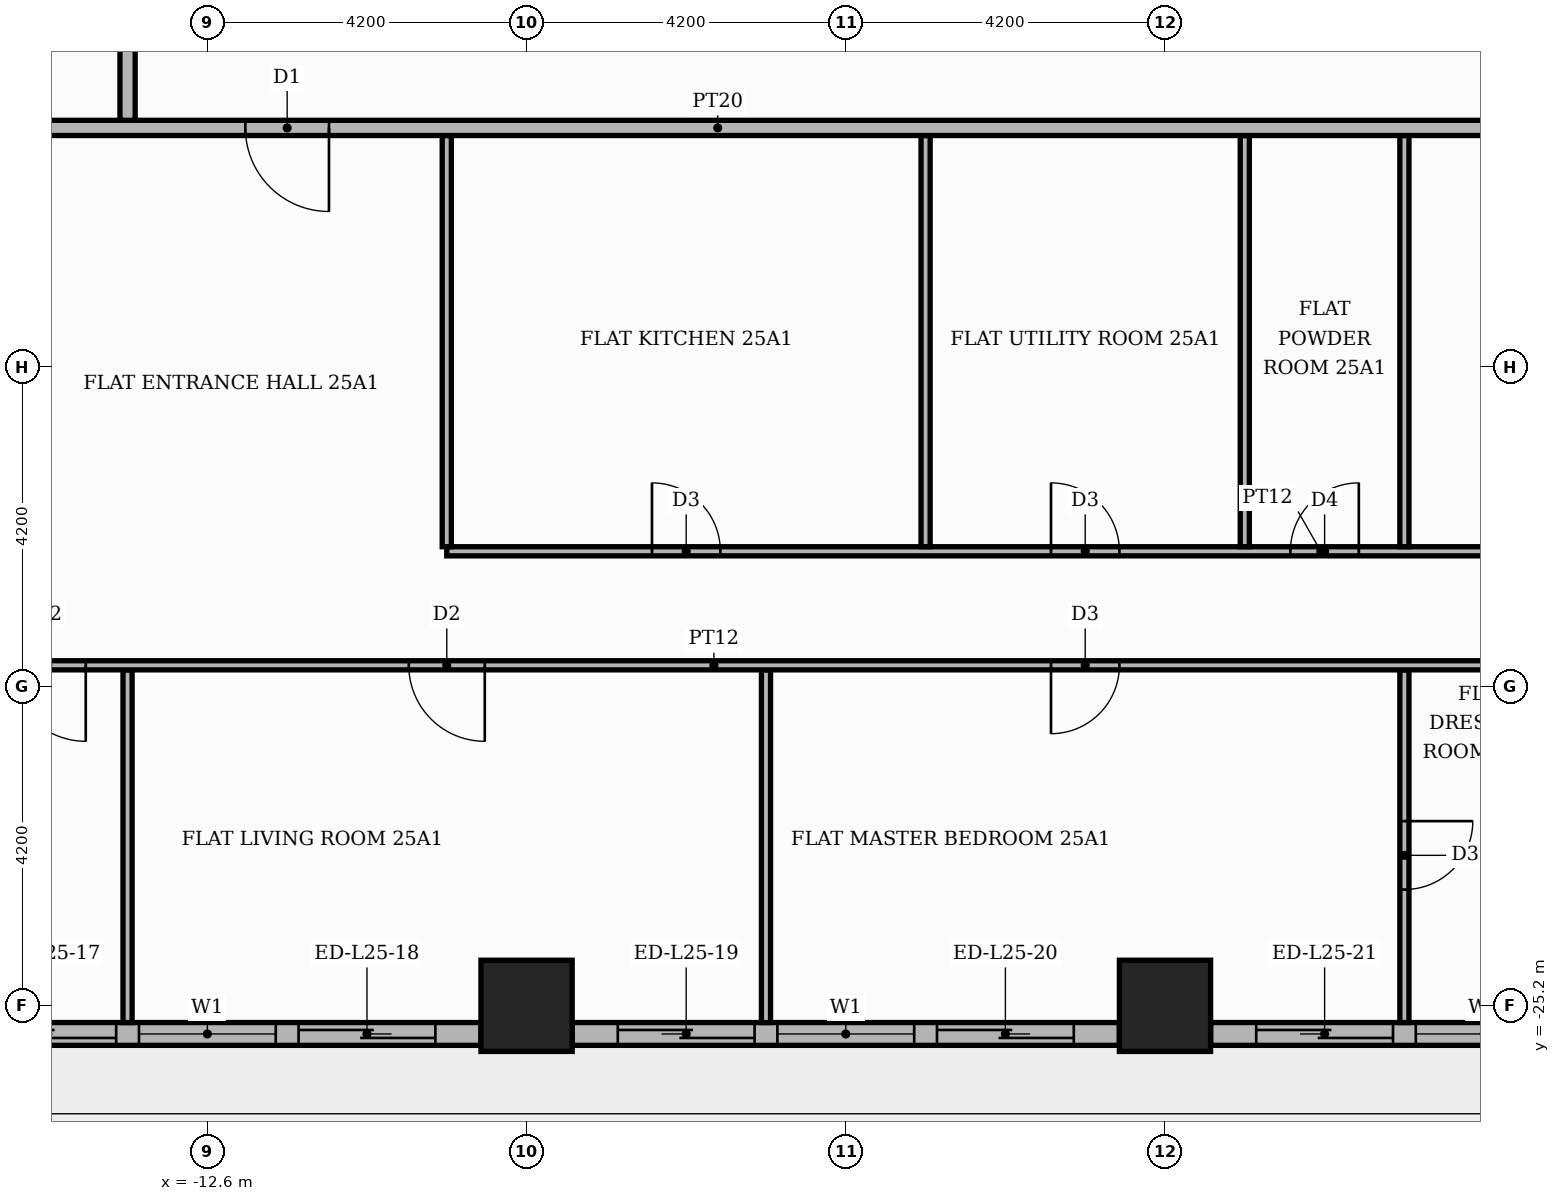
"""IFC4 building model, lengths in metres.
Left out: names, types, materials, properties, quantities, classifications, styles, units other than length and angle.
Written with IfcOpenShell. Run it as: python <this file> out.ifc"""

import sys

from ifc_helpers import new_model, si_unit, direction, frame, frame_2d, origin, origin_2d, place, context, subcontext, project, spatial, rectangle, extrude, element, fill, save


model = new_model("IFC4")
c1 = context("Model", 3, precision=1e-05, world=origin(), true_north=direction((0.0, 1.0)))
c2 = subcontext(c1, "Body", "Model", "MODEL_VIEW")
j1 = project(units=[si_unit("LENGTHUNIT", "METRE"), si_unit("PLANEANGLEUNIT", "RADIAN")], contexts=[c1])
p1 = place(None, origin())
s1 = spatial("IfcSite", under=j1, at=p1, CompositionType="ELEMENT")
p2 = place(p1, origin())
s2 = spatial("IfcBuilding", under=s1, at=p2, CompositionType="ELEMENT")
p3 = place(p2, frame((0.0, 0.0, 106.5)))
s3 = spatial("IfcBuildingStorey", under=s2, at=p3, CompositionType="ELEMENT", Elevation=106.5)
for number, where, z_axis, x_axis in (
    (1, (0.0, -25.2, 0.0), (0.0, 0.0, 1.0), (1.0, 0.0, 0.0)),
    (2, (-8.4, -25.2, 0.0), (0.0, 0.0, 1.0), (1.0, 0.0, 0.0)),
):
    element("IfcColumn", number, at=place(p3, frame(where, z_axis=z_axis, x_axis=x_axis)), inside=s3, PredefinedType="COLUMN", context=c2, shape_type="SweptSolid", body=[
        extrude(rectangle(XDim=1.2, YDim=1.2, at=origin_2d()), origin(), (0.0, 0.0, 1.0), 3.9),
    ])
p4 = place(p3, frame((-16.2, -25.57, 0.0), z_axis=(0.0, 0.0, 1.0), x_axis=(1.0, 0.0, 0.0)))
e3 = element("IfcWall", 3, at=p4, inside=s3, PredefinedType="STANDARD", context=c2, shape_type="SweptSolid", body=[
    extrude(rectangle(XDim=7.2, YDim=0.3, at=frame_2d((3.6, 0.0))), origin(), (0.0, 0.0, 1.0), 3.48),
])
p5 = place(p4, frame((0.6, 0.0, 0.0)))
e4 = element("IfcOpeningElement", 4, at=p5, cuts=e3, PredefinedType="OPENING", context=c2, shape_type="SweptSolid", body=[
    extrude(rectangle(XDim=1.8, YDim=2.4, at=frame_2d((0.9, 1.2))), frame((0.0, 0.16, 0.0), z_axis=(0.0, -1.0, 0.0), x_axis=(1.0, 0.0, 0.0)), (0.0, 0.0, 1.0), 0.32),
])
p6 = place(p4, frame((2.7, 0.0, 0.9)))
e5 = element("IfcOpeningElement", 5, at=p6, cuts=e3, PredefinedType="OPENING", context=c2, shape_type="SweptSolid", body=[
    extrude(rectangle(XDim=1.8, YDim=2.1, at=frame_2d((0.9, 1.05))), frame((0.0, 0.16, 0.0), z_axis=(0.0, -1.0, 0.0), x_axis=(1.0, 0.0, 0.0)), (0.0, 0.0, 1.0), 0.32),
])
p7 = place(p4, frame((4.8, 0.0, 0.0)))
e6 = element("IfcOpeningElement", 6, at=p7, cuts=e3, PredefinedType="OPENING", context=c2, shape_type="SweptSolid", body=[
    extrude(rectangle(XDim=1.8, YDim=2.4, at=frame_2d((0.9, 1.2))), frame((0.0, 0.16, 0.0), z_axis=(0.0, -1.0, 0.0), x_axis=(1.0, 0.0, 0.0)), (0.0, 0.0, 1.0), 0.32),
])
p8 = place(p3, frame((-7.8, -25.57, 0.0), z_axis=(0.0, 0.0, 1.0), x_axis=(1.0, 0.0, 0.0)))
e7 = element("IfcWall", 7, at=p8, inside=s3, PredefinedType="STANDARD", context=c2, shape_type="SweptSolid", body=[
    extrude(rectangle(XDim=7.2, YDim=0.3, at=frame_2d((3.6, 0.0))), origin(), (0.0, 0.0, 1.0), 3.48),
])
p9 = place(p8, frame((0.6, 0.0, 0.0)))
e8 = element("IfcOpeningElement", 8, at=p9, cuts=e7, PredefinedType="OPENING", context=c2, shape_type="SweptSolid", body=[
    extrude(rectangle(XDim=1.8, YDim=2.4, at=frame_2d((0.9, 1.2))), frame((0.0, 0.16, 0.0), z_axis=(0.0, -1.0, 0.0), x_axis=(1.0, 0.0, 0.0)), (0.0, 0.0, 1.0), 0.32),
])
p10 = place(p8, frame((2.7, 0.0, 0.9)))
e9 = element("IfcOpeningElement", 9, at=p10, cuts=e7, PredefinedType="OPENING", context=c2, shape_type="SweptSolid", body=[
    extrude(rectangle(XDim=1.8, YDim=2.1, at=frame_2d((0.9, 1.05))), frame((0.0, 0.16, 0.0), z_axis=(0.0, -1.0, 0.0), x_axis=(1.0, 0.0, 0.0)), (0.0, 0.0, 1.0), 0.32),
])
p11 = place(p8, frame((4.8, 0.0, 0.0)))
e10 = element("IfcOpeningElement", 10, at=p11, cuts=e7, PredefinedType="OPENING", context=c2, shape_type="SweptSolid", body=[
    extrude(rectangle(XDim=1.8, YDim=2.4, at=frame_2d((0.9, 1.2))), frame((0.0, 0.16, 0.0), z_axis=(0.0, -1.0, 0.0), x_axis=(1.0, 0.0, 0.0)), (0.0, 0.0, 1.0), 0.32),
])
p12 = place(p3, frame((0.6, -25.57, 0.0), z_axis=(0.0, 0.0, 1.0), x_axis=(1.0, 0.0, 0.0)))
e11 = element("IfcWall", 11, at=p12, inside=s3, PredefinedType="STANDARD", context=c2, shape_type="SweptSolid", body=[
    extrude(rectangle(XDim=7.2, YDim=0.3, at=frame_2d((3.6, 0.0))), origin(), (0.0, 0.0, 1.0), 3.48),
])
p13 = place(p12, frame((0.6, 0.0, 0.0)))
e12 = element("IfcOpeningElement", 12, at=p13, cuts=e11, PredefinedType="OPENING", context=c2, shape_type="SweptSolid", body=[
    extrude(rectangle(XDim=1.8, YDim=2.4, at=frame_2d((0.9, 1.2))), frame((0.0, 0.16, 0.0), z_axis=(0.0, -1.0, 0.0), x_axis=(1.0, 0.0, 0.0)), (0.0, 0.0, 1.0), 0.32),
])
p14 = place(p12, frame((2.7, 0.0, 0.9)))
e13 = element("IfcOpeningElement", 13, at=p14, cuts=e11, PredefinedType="OPENING", context=c2, shape_type="SweptSolid", body=[
    extrude(rectangle(XDim=1.8, YDim=2.1, at=frame_2d((0.9, 1.05))), frame((0.0, 0.16, 0.0), z_axis=(0.0, -1.0, 0.0), x_axis=(1.0, 0.0, 0.0)), (0.0, 0.0, 1.0), 0.32),
])
p15 = place(p12, frame((4.8, 0.0, 0.9)))
e14 = element("IfcOpeningElement", 14, at=p15, cuts=e11, PredefinedType="OPENING", context=c2, shape_type="SweptSolid", body=[
    extrude(rectangle(XDim=1.8, YDim=2.1, at=frame_2d((0.9, 1.05))), frame((0.0, 0.16, 0.0), z_axis=(0.0, -1.0, 0.0), x_axis=(1.0, 0.0, 0.0)), (0.0, 0.0, 1.0), 0.32),
])
for number, where, z_axis, x_axis in (
    (15, (-13.65, -25.42, 0.0), (0.0, 0.0, 1.0), (0.0, 1.0, 0.0)),
    (16, (-5.25, -25.42, 0.0), (0.0, 0.0, 1.0), (0.0, 1.0, 0.0)),
):
    element("IfcWall", number, at=place(p3, frame(where, z_axis=z_axis, x_axis=x_axis)), inside=s3, PredefinedType="PARTITIONING", context=c2, shape_type="SweptSolid", body=[
        extrude(rectangle(XDim=4.64, YDim=0.12, at=frame_2d((2.32, 0.0))), origin(), (0.0, 0.0, 1.0), 3.48),
    ])
p16 = place(p3, frame((3.15, -25.42, 0.0), z_axis=(0.0, 0.0, 1.0), x_axis=(0.0, 1.0, 0.0)))
e17 = element("IfcWall", 17, at=p16, inside=s3, PredefinedType="PARTITIONING", context=c2, shape_type="SweptSolid", body=[
    extrude(rectangle(XDim=4.64, YDim=0.12, at=frame_2d((2.32, 0.0))), origin(), (0.0, 0.0, 1.0), 3.48),
])
p17 = place(p16, frame((1.75, 0.0, 0.0)))
e18 = element("IfcOpeningElement", 18, at=p17, cuts=e17, PredefinedType="OPENING", context=c2, shape_type="SweptSolid", body=[
    extrude(rectangle(XDim=0.9, YDim=2.1, at=frame_2d((0.45, 1.05))), frame((0.0, 0.07, 0.0), z_axis=(0.0, -1.0, 0.0), x_axis=(1.0, 0.0, 0.0)), (0.0, 0.0, 1.0), 0.14),
])
p18 = place(p3, frame((-25.42, -20.72, 0.0), z_axis=(0.0, 0.0, 1.0), x_axis=(1.0, 0.0, 0.0)))
e19 = element("IfcWall", 19, at=p18, inside=s3, PredefinedType="PARTITIONING", context=c2, shape_type="SweptSolid", body=[
    extrude(rectangle(XDim=38.97, YDim=0.12, at=frame_2d((19.485, 0.0))), origin(), (0.0, 0.0, 1.0), 3.48),
])
p19 = place(p18, frame((10.22, 0.0, 0.0)))
e20 = element("IfcOpeningElement", 20, at=p19, cuts=e19, PredefinedType="OPENING", context=c2, shape_type="SweptSolid", body=[
    extrude(rectangle(XDim=1.0, YDim=2.1, at=frame_2d((0.5, 1.05))), frame((0.0, 0.07, 0.0), z_axis=(0.0, -1.0, 0.0), x_axis=(1.0, 0.0, 0.0)), (0.0, 0.0, 1.0), 0.14),
])
p20 = place(p18, frame((15.47, 0.0, 0.0)))
e21 = element("IfcOpeningElement", 21, at=p20, cuts=e19, PredefinedType="OPENING", context=c2, shape_type="SweptSolid", body=[
    extrude(rectangle(XDim=1.0, YDim=2.1, at=frame_2d((0.5, 1.05))), frame((0.0, 0.07, 0.0), z_axis=(0.0, -1.0, 0.0), x_axis=(1.0, 0.0, 0.0)), (0.0, 0.0, 1.0), 0.14),
])
p21 = place(p18, frame((23.92, 0.0, 0.0)))
e22 = element("IfcOpeningElement", 22, at=p21, cuts=e19, PredefinedType="OPENING", context=c2, shape_type="SweptSolid", body=[
    extrude(rectangle(XDim=0.9, YDim=2.1, at=frame_2d((0.45, 1.05))), frame((0.0, 0.07, 0.0), z_axis=(0.0, -1.0, 0.0), x_axis=(1.0, 0.0, 0.0)), (0.0, 0.0, 1.0), 0.14),
])
p22 = place(p18, frame((34.42, 0.0, 0.0)))
e23 = element("IfcOpeningElement", 23, at=p22, cuts=e19, PredefinedType="OPENING", context=c2, shape_type="SweptSolid", body=[
    extrude(rectangle(XDim=0.9, YDim=2.1, at=frame_2d((0.45, 1.05))), frame((0.0, 0.07, 0.0), z_axis=(0.0, -1.0, 0.0), x_axis=(1.0, 0.0, 0.0)), (0.0, 0.0, 1.0), 0.14),
])
p23 = place(p3, frame((-9.45, -19.22, 0.0), z_axis=(0.0, 0.0, 1.0), x_axis=(1.0, 0.0, 0.0)))
e24 = element("IfcWall", 24, at=p23, inside=s3, PredefinedType="PARTITIONING", context=c2, shape_type="SweptSolid", body=[
    extrude(rectangle(XDim=23.0, YDim=0.12, at=frame_2d((11.5, 0.0))), origin(), (0.0, 0.0, 1.0), 3.48),
])
p24 = place(p23, frame((2.7, 0.0, 0.0)))
e25 = element("IfcOpeningElement", 25, at=p24, cuts=e24, PredefinedType="OPENING", context=c2, shape_type="SweptSolid", body=[
    extrude(rectangle(XDim=0.9, YDim=2.1, at=frame_2d((0.45, 1.05))), frame((0.0, 0.07, 0.0), z_axis=(0.0, -1.0, 0.0), x_axis=(1.0, 0.0, 0.0)), (0.0, 0.0, 1.0), 0.14),
])
p25 = place(p23, frame((7.95, 0.0, 0.0)))
e26 = element("IfcOpeningElement", 26, at=p25, cuts=e24, PredefinedType="OPENING", context=c2, shape_type="SweptSolid", body=[
    extrude(rectangle(XDim=0.9, YDim=2.1, at=frame_2d((0.45, 1.05))), frame((0.0, 0.07, 0.0), z_axis=(0.0, -1.0, 0.0), x_axis=(1.0, 0.0, 0.0)), (0.0, 0.0, 1.0), 0.14),
])
p26 = place(p23, frame((11.1, 0.0, 0.0)))
e27 = element("IfcOpeningElement", 27, at=p26, cuts=e24, PredefinedType="OPENING", context=c2, shape_type="SweptSolid", body=[
    extrude(rectangle(XDim=0.9, YDim=2.1, at=frame_2d((0.45, 1.05))), frame((0.0, 0.07, 0.0), z_axis=(0.0, -1.0, 0.0), x_axis=(1.0, 0.0, 0.0)), (0.0, 0.0, 1.0), 0.14),
])
p27 = place(p23, frame((15.15, 0.0, 0.0)))
e28 = element("IfcOpeningElement", 28, at=p27, cuts=e24, PredefinedType="OPENING", context=c2, shape_type="SweptSolid", body=[
    extrude(rectangle(XDim=0.9, YDim=2.1, at=frame_2d((0.45, 1.05))), frame((0.0, 0.07, 0.0), z_axis=(0.0, -1.0, 0.0), x_axis=(1.0, 0.0, 0.0)), (0.0, 0.0, 1.0), 0.14),
])
p28 = place(p23, frame((19.35, 0.0, 0.0)))
e29 = element("IfcOpeningElement", 29, at=p28, cuts=e24, PredefinedType="OPENING", context=c2, shape_type="SweptSolid", body=[
    extrude(rectangle(XDim=0.9, YDim=2.1, at=frame_2d((0.45, 1.05))), frame((0.0, 0.07, 0.0), z_axis=(0.0, -1.0, 0.0), x_axis=(1.0, 0.0, 0.0)), (0.0, 0.0, 1.0), 0.14),
])
p29 = place(p23, frame((21.6, 0.0, 0.0)))
e30 = element("IfcOpeningElement", 30, at=p29, cuts=e24, PredefinedType="OPENING", context=c2, shape_type="SweptSolid", body=[
    extrude(rectangle(XDim=0.9, YDim=2.1, at=frame_2d((0.45, 1.05))), frame((0.0, 0.07, 0.0), z_axis=(0.0, -1.0, 0.0), x_axis=(1.0, 0.0, 0.0)), (0.0, 0.0, 1.0), 0.14),
])
for number, where, z_axis, x_axis in (
    (31, (-9.45, -19.16, 0.0), (0.0, 0.0, 1.0), (0.0, 1.0, 0.0)),
    (32, (-3.15, -19.16, 0.0), (0.0, 0.0, 1.0), (0.0, 1.0, 0.0)),
    (33, (1.05, -19.16, 0.0), (0.0, 0.0, 1.0), (0.0, 1.0, 0.0)),
    (34, (3.15, -19.16, 0.0), (0.0, 0.0, 1.0), (0.0, 1.0, 0.0)),
):
    element("IfcWall", number, at=place(p3, frame(where, z_axis=z_axis, x_axis=x_axis)), inside=s3, PredefinedType="PARTITIONING", context=c2, shape_type="SweptSolid", body=[
        extrude(rectangle(XDim=5.41, YDim=0.12, at=frame_2d((2.705, 0.0))), origin(), (0.0, 0.0, 1.0), 3.48),
    ])
p30 = place(p3, frame((-25.42, -13.65, 0.0), z_axis=(0.0, 0.0, 1.0), x_axis=(1.0, 0.0, 0.0)))
e35 = element("IfcWall", 35, at=p30, inside=s3, PredefinedType="PARTITIONING", context=c2, shape_type="SweptSolid", body=[
    extrude(rectangle(XDim=39.07, YDim=0.2, at=frame_2d((19.535, 0.0))), origin(), (0.0, 0.0, 1.0), 3.48),
])
p31 = place(p30, frame((13.32, 0.0, 0.0)))
e36 = element("IfcOpeningElement", 36, at=p31, cuts=e35, PredefinedType="OPENING", context=c2, shape_type="SweptSolid", body=[
    extrude(rectangle(XDim=1.1, YDim=2.4, at=frame_2d((0.55, 1.2))), frame((0.0, 0.11, 0.0), z_axis=(0.0, -1.0, 0.0), x_axis=(1.0, 0.0, 0.0)), (0.0, 0.0, 1.0), 0.22),
])
p32 = place(p3, frame((-13.65, -13.55, 0.0), z_axis=(0.0, 0.0, 1.0), x_axis=(0.0, 1.0, 0.0)))
e37 = element("IfcWall", 37, at=p32, inside=s3, PredefinedType="PARTITIONING", context=c2, shape_type="SweptSolid", body=[
    extrude(rectangle(XDim=27.1, YDim=0.2, at=frame_2d((13.55, 0.0))), origin(), (0.0, 0.0, 1.0), 3.48),
])
p33 = place(p32, frame((24.55, 0.0, 0.0)))
e38 = element("IfcOpeningElement", 38, at=p33, cuts=e37, PredefinedType="OPENING", context=c2, shape_type="SweptSolid", body=[
    extrude(rectangle(XDim=1.1, YDim=2.4, at=frame_2d((0.55, 1.2))), frame((0.0, 0.11, 0.0), z_axis=(0.0, -1.0, 0.0), x_axis=(1.0, 0.0, 0.0)), (0.0, 0.0, 1.0), 0.22),
])
p34 = place(p5, origin())
e39 = element("IfcDoor", 39, at=p34, inside=s3, OperationType="SLIDING_TO_LEFT", PredefinedType="DOOR", context=c2, shape_type="SweptSolid", body=[
    extrude(rectangle(XDim=1.8, YDim=2.4, at=frame_2d((0.9, 1.2))), frame((0.0, 0.025, 0.0), z_axis=(0.0, -1.0, 0.0), x_axis=(1.0, 0.0, 0.0)), (0.0, 0.0, 1.0), 0.05),
])
fill(e4, e39)
p35 = place(p6, origin())
e40 = element("IfcWindow", 40, at=p35, inside=s3, PartitioningType="SINGLE_PANEL", PredefinedType="WINDOW", context=c2, shape_type="SweptSolid", body=[
    extrude(rectangle(XDim=1.8, YDim=2.1, at=frame_2d((0.9, 1.05))), frame((0.0, 0.03, 0.0), z_axis=(0.0, -1.0, 0.0), x_axis=(1.0, 0.0, 0.0)), (0.0, 0.0, 1.0), 0.06),
])
fill(e5, e40)
p36 = place(p7, origin())
e41 = element("IfcDoor", 41, at=p36, inside=s3, OperationType="SLIDING_TO_RIGHT", PredefinedType="DOOR", context=c2, shape_type="SweptSolid", body=[
    extrude(rectangle(XDim=1.8, YDim=2.4, at=frame_2d((0.9, 1.2))), frame((0.0, 0.025, 0.0), z_axis=(0.0, -1.0, 0.0), x_axis=(1.0, 0.0, 0.0)), (0.0, 0.0, 1.0), 0.05),
])
fill(e6, e41)
p37 = place(p9, origin())
e42 = element("IfcDoor", 42, at=p37, inside=s3, OperationType="SLIDING_TO_LEFT", PredefinedType="DOOR", context=c2, shape_type="SweptSolid", body=[
    extrude(rectangle(XDim=1.8, YDim=2.4, at=frame_2d((0.9, 1.2))), frame((0.0, 0.025, 0.0), z_axis=(0.0, -1.0, 0.0), x_axis=(1.0, 0.0, 0.0)), (0.0, 0.0, 1.0), 0.05),
])
fill(e8, e42)
p38 = place(p10, origin())
e43 = element("IfcWindow", 43, at=p38, inside=s3, PartitioningType="SINGLE_PANEL", PredefinedType="WINDOW", context=c2, shape_type="SweptSolid", body=[
    extrude(rectangle(XDim=1.8, YDim=2.1, at=frame_2d((0.9, 1.05))), frame((0.0, 0.03, 0.0), z_axis=(0.0, -1.0, 0.0), x_axis=(1.0, 0.0, 0.0)), (0.0, 0.0, 1.0), 0.06),
])
fill(e9, e43)
p39 = place(p11, origin())
e44 = element("IfcDoor", 44, at=p39, inside=s3, OperationType="SLIDING_TO_RIGHT", PredefinedType="DOOR", context=c2, shape_type="SweptSolid", body=[
    extrude(rectangle(XDim=1.8, YDim=2.4, at=frame_2d((0.9, 1.2))), frame((0.0, 0.025, 0.0), z_axis=(0.0, -1.0, 0.0), x_axis=(1.0, 0.0, 0.0)), (0.0, 0.0, 1.0), 0.05),
])
fill(e10, e44)
p40 = place(p13, origin())
e45 = element("IfcDoor", 45, at=p40, inside=s3, OperationType="SLIDING_TO_LEFT", PredefinedType="DOOR", context=c2, shape_type="SweptSolid", body=[
    extrude(rectangle(XDim=1.8, YDim=2.4, at=frame_2d((0.9, 1.2))), frame((0.0, 0.025, 0.0), z_axis=(0.0, -1.0, 0.0), x_axis=(1.0, 0.0, 0.0)), (0.0, 0.0, 1.0), 0.05),
])
fill(e12, e45)
p41 = place(p14, origin())
e46 = element("IfcWindow", 46, at=p41, inside=s3, PartitioningType="SINGLE_PANEL", PredefinedType="WINDOW", context=c2, shape_type="SweptSolid", body=[
    extrude(rectangle(XDim=1.8, YDim=2.1, at=frame_2d((0.9, 1.05))), frame((0.0, 0.03, 0.0), z_axis=(0.0, -1.0, 0.0), x_axis=(1.0, 0.0, 0.0)), (0.0, 0.0, 1.0), 0.06),
])
fill(e13, e46)
p42 = place(p31, frame((1.1, 0.0, 0.0), z_axis=(0.0, 0.0, 1.0), x_axis=(-1.0, 0.0, 0.0)))
e47 = element("IfcDoor", 47, at=p42, inside=s3, OperationType="SINGLE_SWING_RIGHT", PredefinedType="DOOR", context=c2, shape_type="SweptSolid", body=[
    extrude(rectangle(XDim=1.1, YDim=2.4, at=frame_2d((0.55, 1.2))), frame((0.0, 0.025, 0.0), z_axis=(0.0, -1.0, 0.0), x_axis=(1.0, 0.0, 0.0)), (0.0, 0.0, 1.0), 0.05),
])
fill(e36, e47)
p43 = place(p24, origin())
e48 = element("IfcDoor", 48, at=p43, inside=s3, OperationType="SINGLE_SWING_LEFT", PredefinedType="DOOR", context=c2, shape_type="SweptSolid", body=[
    extrude(rectangle(XDim=0.9, YDim=2.1, at=frame_2d((0.45, 1.05))), frame((0.0, 0.025, 0.0), z_axis=(0.0, -1.0, 0.0), x_axis=(1.0, 0.0, 0.0)), (0.0, 0.0, 1.0), 0.05),
])
fill(e25, e48)
p44 = place(p25, origin())
e49 = element("IfcDoor", 49, at=p44, inside=s3, OperationType="SINGLE_SWING_LEFT", PredefinedType="DOOR", context=c2, shape_type="SweptSolid", body=[
    extrude(rectangle(XDim=0.9, YDim=2.1, at=frame_2d((0.45, 1.05))), frame((0.0, 0.025, 0.0), z_axis=(0.0, -1.0, 0.0), x_axis=(1.0, 0.0, 0.0)), (0.0, 0.0, 1.0), 0.05),
])
fill(e26, e49)
p45 = place(p26, origin())
e50 = element("IfcDoor", 50, at=p45, inside=s3, OperationType="SINGLE_SWING_RIGHT", PredefinedType="DOOR", context=c2, shape_type="SweptSolid", body=[
    extrude(rectangle(XDim=0.9, YDim=2.1, at=frame_2d((0.45, 1.05))), frame((0.0, 0.025, 0.0), z_axis=(0.0, -1.0, 0.0), x_axis=(1.0, 0.0, 0.0)), (0.0, 0.0, 1.0), 0.05),
])
fill(e27, e50)
p46 = place(p19, frame((1.0, 0.0, 0.0), z_axis=(0.0, 0.0, 1.0), x_axis=(-1.0, 0.0, 0.0)))
e51 = element("IfcDoor", 51, at=p46, inside=s3, OperationType="SINGLE_SWING_RIGHT", PredefinedType="DOOR", context=c2, shape_type="SweptSolid", body=[
    extrude(rectangle(XDim=1.0, YDim=2.1, at=frame_2d((0.5, 1.05))), frame((0.0, 0.025, 0.0), z_axis=(0.0, -1.0, 0.0), x_axis=(1.0, 0.0, 0.0)), (0.0, 0.0, 1.0), 0.05),
])
fill(e20, e51)
p47 = place(p20, frame((1.0, 0.0, 0.0), z_axis=(0.0, 0.0, 1.0), x_axis=(-1.0, 0.0, 0.0)))
e52 = element("IfcDoor", 52, at=p47, inside=s3, OperationType="SINGLE_SWING_RIGHT", PredefinedType="DOOR", context=c2, shape_type="SweptSolid", body=[
    extrude(rectangle(XDim=1.0, YDim=2.1, at=frame_2d((0.5, 1.05))), frame((0.0, 0.025, 0.0), z_axis=(0.0, -1.0, 0.0), x_axis=(1.0, 0.0, 0.0)), (0.0, 0.0, 1.0), 0.05),
])
fill(e21, e52)
p48 = place(p21, frame((0.9, 0.0, 0.0), z_axis=(0.0, 0.0, 1.0), x_axis=(-1.0, 0.0, 0.0)))
e53 = element("IfcDoor", 53, at=p48, inside=s3, OperationType="SINGLE_SWING_LEFT", PredefinedType="DOOR", context=c2, shape_type="SweptSolid", body=[
    extrude(rectangle(XDim=0.9, YDim=2.1, at=frame_2d((0.45, 1.05))), frame((0.0, 0.025, 0.0), z_axis=(0.0, -1.0, 0.0), x_axis=(1.0, 0.0, 0.0)), (0.0, 0.0, 1.0), 0.05),
])
fill(e22, e53)
p49 = place(p17, frame((0.9, 0.0, 0.0), z_axis=(0.0, 0.0, 1.0), x_axis=(-1.0, 0.0, 0.0)))
e54 = element("IfcDoor", 54, at=p49, inside=s3, OperationType="SINGLE_SWING_RIGHT", PredefinedType="DOOR", context=c2, shape_type="SweptSolid", body=[
    extrude(rectangle(XDim=0.9, YDim=2.1, at=frame_2d((0.45, 1.05))), frame((0.0, 0.025, 0.0), z_axis=(0.0, -1.0, 0.0), x_axis=(1.0, 0.0, 0.0)), (0.0, 0.0, 1.0), 0.05),
])
fill(e18, e54)
save(model, sys.argv[1])
